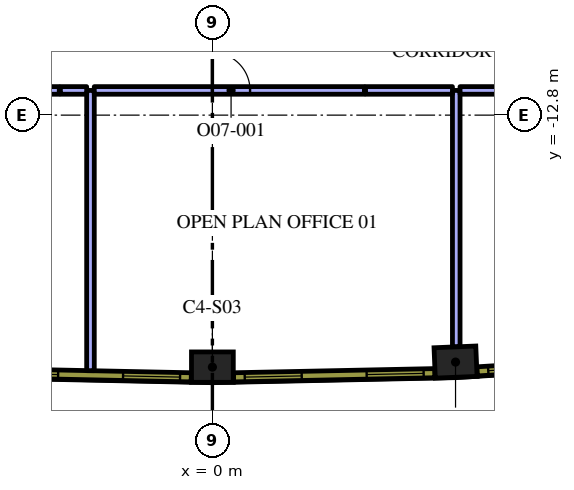
"""IFC4 building model, lengths in metres.
Left out: names, types, materials, properties, quantities, classifications, styles, units other than length and angle.
Written with IfcOpenShell. Run it as: python <this file> out.ifc"""

import sys

from ifc_helpers import new_model, si_unit, direction, frame, frame_2d, origin, origin_2d, place, context, subcontext, project, spatial, rectangle, extrude, element, fill, save


model = new_model("IFC4")
c1 = context("Model", 3, precision=1e-05, world=origin(), true_north=direction((0.0, 1.0)))
c2 = subcontext(c1, "Body", "Model", "MODEL_VIEW")
j1 = project(units=[si_unit("LENGTHUNIT", "METRE"), si_unit("PLANEANGLEUNIT", "RADIAN")], contexts=[c1])
p1 = place(None, origin())
s1 = spatial("IfcSite", under=j1, at=p1, CompositionType="ELEMENT")
p2 = place(p1, origin())
s2 = spatial("IfcBuilding", under=s1, at=p2, CompositionType="ELEMENT")
p3 = place(p2, frame((0.0, 0.0, 222.6)))
s3 = spatial("IfcBuildingStorey", under=s2, at=p3, CompositionType="ELEMENT", Elevation=222.6)
for number, where, z_axis, x_axis in (
    (1, (0.0, -19.431, 0.0), (0.0, 0.0, 1.0), (1.0, 0.0, 0.0)),
    (2, (6.398, -19.298, 0.0), (0.0, 0.0, 1.0), (0.999, 0.041, 0.0)),
):
    element("IfcColumn", number, at=place(p3, frame(where, z_axis=z_axis, x_axis=x_axis)), inside=s3, PredefinedType="COLUMN", context=c2, shape_type="SweptSolid", body=[
        extrude(rectangle(XDim=1.1, YDim=0.8, at=origin_2d()), origin(), (0.0, 0.0, 1.0), 4.2),
    ])
p4 = place(p3, frame((6.417, -12.15, 0.0), z_axis=(0.0, 0.0, 1.0), x_axis=(0.0, -1.0, 0.0)))
e3 = element("IfcWall", 3, at=p4, inside=s3, PredefinedType="PARTITIONING", context=c2, shape_type="SweptSolid", body=[
    extrude(rectangle(XDim=6.747, YDim=0.2, at=frame_2d((3.374, 0.0))), origin(), (0.0, 0.0, 1.0), 3.45),
])
p5 = place(p3, frame((-3.208, -19.524, 0.0), z_axis=(0.0, 0.0, 1.0), x_axis=(0.0, 1.0, 0.0)))
e4 = element("IfcWall", 4, at=p5, inside=s3, PredefinedType="PARTITIONING", context=c2, shape_type="SweptSolid", body=[
    extrude(rectangle(XDim=7.374, YDim=0.2, at=frame_2d((3.687, 0.0))), origin(), (0.0, 0.0, 1.0), 3.45),
])
p6 = place(p3, frame((-3.108, -12.15, 0.0), z_axis=(0.0, 0.0, 1.0), x_axis=(1.0, 0.0, 0.0)))
e5 = element("IfcWall", 5, at=p6, inside=s3, PredefinedType="PARTITIONING", context=c2, shape_type="SweptSolid", body=[
    extrude(rectangle(XDim=7.108, YDim=0.2, at=frame_2d((3.554, 0.0))), origin(), (0.0, 0.0, 1.0), 3.45),
])
p7 = place(p6, frame((3.1, 0.0, 0.0)))
e6 = element("IfcOpeningElement", 6, at=p7, cuts=e5, PredefinedType="OPENING", context=c2, shape_type="SweptSolid", body=[
    extrude(rectangle(XDim=1.0, YDim=2.1, at=frame_2d((0.5, 1.05))), frame((0.0, 0.11, 0.0), z_axis=(0.0, -1.0, 0.0), x_axis=(1.0, 0.0, 0.0)), (0.0, 0.0, 1.0), 0.22),
])
p8 = place(p3, frame((4.03, -12.15, 0.0), z_axis=(0.0, 0.0, 1.0), x_axis=(1.0, 0.0, 0.0)))
e7 = element("IfcWall", 7, at=p8, inside=s3, PredefinedType="PARTITIONING", context=c2, shape_type="SweptSolid", body=[
    extrude(rectangle(XDim=2.287, YDim=0.2, at=frame_2d((1.144, 0.0))), origin(), (0.0, 0.0, 1.0), 3.45),
])
p9 = place(p3, frame((6.517, -12.15, 0.0), z_axis=(0.0, 0.0, 1.0), x_axis=(1.0, 0.0, 0.0)))
e8 = element("IfcWall", 8, at=p9, inside=s3, PredefinedType="PARTITIONING", context=c2, shape_type="SweptSolid", body=[
    extrude(rectangle(XDim=7.83, YDim=0.2, at=frame_2d((3.915, 0.0))), origin(), (0.0, 0.0, 1.0), 3.45),
])
p10 = place(p9, frame((3.4, 0.0, 0.0)))
e9 = element("IfcOpeningElement", 9, at=p10, cuts=e8, PredefinedType="OPENING", context=c2, shape_type="SweptSolid", body=[
    extrude(rectangle(XDim=1.0, YDim=2.1, at=frame_2d((0.5, 1.05))), frame((0.0, 0.11, 0.0), z_axis=(0.0, -1.0, 0.0), x_axis=(1.0, 0.0, 0.0)), (0.0, 0.0, 1.0), 0.22),
])
p11 = place(p3, frame((-4.0, -12.15, 0.0), z_axis=(0.0, 0.0, 1.0), x_axis=(1.0, 0.0, 0.0)))
e10 = element("IfcWall", 10, at=p11, inside=s3, PredefinedType="PARTITIONING", context=c2, shape_type="SweptSolid", body=[
    extrude(rectangle(XDim=0.692, YDim=0.2, at=frame_2d((0.346, 0.0))), origin(), (0.0, 0.0, 1.0), 3.45),
])
p12 = place(p3, frame((-12.748, -12.15, 0.0), z_axis=(0.0, 0.0, 1.0), x_axis=(1.0, 0.0, 0.0)))
e11 = element("IfcWall", 11, at=p12, inside=s3, PredefinedType="PARTITIONING", context=c2, shape_type="SweptSolid", body=[
    extrude(rectangle(XDim=8.718, YDim=0.2, at=frame_2d((4.359, 0.0))), origin(), (0.0, 0.0, 1.0), 3.45),
])
p13 = place(p3, frame((-5.854, -19.589, 0.0), z_axis=(0.0, 0.0, 1.0), x_axis=(0.999784035184, -0.020781794712, 0.0)))
e12 = element("IfcWall", 12, at=p13, inside=s3, PredefinedType="SOLIDWALL", context=c2, shape_type="SweptSolid", body=[
    extrude(rectangle(XDim=5.298, YDim=0.24, at=frame_2d((2.649, 0.0))), origin(), (0.0, 0.0, 1.0), 3.95),
])
p14 = place(p13, frame((0.294, 0.0, 0.9)))
e13 = element("IfcOpeningElement", 13, at=p14, cuts=e12, PredefinedType="OPENING", context=c2, shape_type="SweptSolid", body=[
    extrude(rectangle(XDim=1.5, YDim=2.55, at=frame_2d((0.75, 1.275))), frame((0.0, 0.13, 0.0), z_axis=(0.0, -1.0, 0.0), x_axis=(1.0, 0.0, 0.0)), (0.0, 0.0, 1.0), 0.26),
])
p15 = place(p13, frame((3.504, 0.0, 0.9)))
e14 = element("IfcOpeningElement", 14, at=p15, cuts=e12, PredefinedType="OPENING", context=c2, shape_type="SweptSolid", body=[
    extrude(rectangle(XDim=1.5, YDim=2.55, at=frame_2d((0.75, 1.275))), frame((0.0, 0.13, 0.0), z_axis=(0.0, -1.0, 0.0), x_axis=(1.0, 0.0, 0.0)), (0.0, 0.0, 1.0), 0.26),
])
p16 = place(p3, frame((0.556, -19.699, 0.0), z_axis=(0.0, 0.0, 1.0), x_axis=(0.999784035184, 0.020781794712, 0.0)))
e15 = element("IfcWall", 15, at=p16, inside=s3, PredefinedType="SOLIDWALL", context=c2, shape_type="SweptSolid", body=[
    extrude(rectangle(XDim=5.298, YDim=0.24, at=frame_2d((2.649, 0.0))), origin(), (0.0, 0.0, 1.0), 3.95),
])
p17 = place(p16, frame((0.294, 0.0, 0.9)))
e16 = element("IfcOpeningElement", 16, at=p17, cuts=e15, PredefinedType="OPENING", context=c2, shape_type="SweptSolid", body=[
    extrude(rectangle(XDim=1.5, YDim=2.55, at=frame_2d((0.75, 1.275))), frame((0.0, 0.13, 0.0), z_axis=(0.0, -1.0, 0.0), x_axis=(1.0, 0.0, 0.0)), (0.0, 0.0, 1.0), 0.26),
])
p18 = place(p16, frame((3.504, 0.0, 0.9)))
e17 = element("IfcOpeningElement", 17, at=p18, cuts=e15, PredefinedType="OPENING", context=c2, shape_type="SweptSolid", body=[
    extrude(rectangle(XDim=1.5, YDim=2.55, at=frame_2d((0.75, 1.275))), frame((0.0, 0.13, 0.0), z_axis=(0.0, -1.0, 0.0), x_axis=(1.0, 0.0, 0.0)), (0.0, 0.0, 1.0), 0.26),
])
p19 = place(p3, frame((6.965, -19.543, 0.0), z_axis=(0.0, 0.0, 1.0), x_axis=(0.9980633213, 0.062206162685, 0.0)))
e18 = element("IfcWall", 18, at=p19, inside=s3, PredefinedType="SOLIDWALL", context=c2, shape_type="SweptSolid", body=[
    extrude(rectangle(XDim=5.298, YDim=0.24, at=frame_2d((2.649, 0.0))), origin(), (0.0, 0.0, 1.0), 3.95),
])
p20 = place(p19, frame((0.295, 0.0, 0.9)))
e19 = element("IfcOpeningElement", 19, at=p20, cuts=e18, PredefinedType="OPENING", context=c2, shape_type="SweptSolid", body=[
    extrude(rectangle(XDim=1.5, YDim=2.55, at=frame_2d((0.75, 1.275))), frame((0.0, 0.13, 0.0), z_axis=(0.0, -1.0, 0.0), x_axis=(1.0, 0.0, 0.0)), (0.0, 0.0, 1.0), 0.26),
])
p21 = place(p19, frame((3.504, 0.0, 0.9)))
e20 = element("IfcOpeningElement", 20, at=p21, cuts=e18, PredefinedType="OPENING", context=c2, shape_type="SweptSolid", body=[
    extrude(rectangle(XDim=1.5, YDim=2.55, at=frame_2d((0.75, 1.275))), frame((0.0, 0.13, 0.0), z_axis=(0.0, -1.0, 0.0), x_axis=(1.0, 0.0, 0.0)), (0.0, 0.0, 1.0), 0.26),
])
p22 = place(p7, origin())
e21 = element("IfcDoor", 21, at=p22, inside=s3, OperationType="SINGLE_SWING_RIGHT", PredefinedType="DOOR", context=c2, shape_type="SweptSolid", body=[
    extrude(rectangle(XDim=1.0, YDim=2.1, at=frame_2d((0.5, 1.05))), frame((0.0, 0.025, 0.0), z_axis=(0.0, -1.0, 0.0), x_axis=(1.0, 0.0, 0.0)), (0.0, 0.0, 1.0), 0.05),
])
fill(e6, e21)
p23 = place(p14, origin())
e22 = element("IfcWindow", 22, at=p23, inside=s3, PartitioningType="SINGLE_PANEL", PredefinedType="WINDOW", context=c2, shape_type="SweptSolid", body=[
    extrude(rectangle(XDim=1.5, YDim=2.55, at=frame_2d((0.75, 1.275))), frame((0.0, 0.04, 0.0), z_axis=(0.0, -1.0, 0.0), x_axis=(1.0, 0.0, 0.0)), (0.0, 0.0, 1.0), 0.06),
])
fill(e13, e22)
p24 = place(p15, origin())
e23 = element("IfcWindow", 23, at=p24, inside=s3, PartitioningType="SINGLE_PANEL", PredefinedType="WINDOW", context=c2, shape_type="SweptSolid", body=[
    extrude(rectangle(XDim=1.5, YDim=2.55, at=frame_2d((0.75, 1.275))), frame((0.0, 0.04, 0.0), z_axis=(0.0, -1.0, 0.0), x_axis=(1.0, 0.0, 0.0)), (0.0, 0.0, 1.0), 0.06),
])
fill(e14, e23)
p25 = place(p17, origin())
e24 = element("IfcWindow", 24, at=p25, inside=s3, PartitioningType="SINGLE_PANEL", PredefinedType="WINDOW", context=c2, shape_type="SweptSolid", body=[
    extrude(rectangle(XDim=1.5, YDim=2.55, at=frame_2d((0.75, 1.275))), frame((0.0, 0.04, 0.0), z_axis=(0.0, -1.0, 0.0), x_axis=(1.0, 0.0, 0.0)), (0.0, 0.0, 1.0), 0.06),
])
fill(e16, e24)
p26 = place(p18, origin())
e25 = element("IfcWindow", 25, at=p26, inside=s3, PartitioningType="SINGLE_PANEL", PredefinedType="WINDOW", context=c2, shape_type="SweptSolid", body=[
    extrude(rectangle(XDim=1.5, YDim=2.55, at=frame_2d((0.75, 1.275))), frame((0.0, 0.04, 0.0), z_axis=(0.0, -1.0, 0.0), x_axis=(1.0, 0.0, 0.0)), (0.0, 0.0, 1.0), 0.06),
])
fill(e17, e25)
p27 = place(p20, origin())
e26 = element("IfcWindow", 26, at=p27, inside=s3, PartitioningType="SINGLE_PANEL", PredefinedType="WINDOW", context=c2, shape_type="SweptSolid", body=[
    extrude(rectangle(XDim=1.5, YDim=2.55, at=frame_2d((0.75, 1.275))), frame((0.0, 0.04, 0.0), z_axis=(0.0, -1.0, 0.0), x_axis=(1.0, 0.0, 0.0)), (0.0, 0.0, 1.0), 0.06),
])
fill(e19, e26)
save(model, sys.argv[1])
